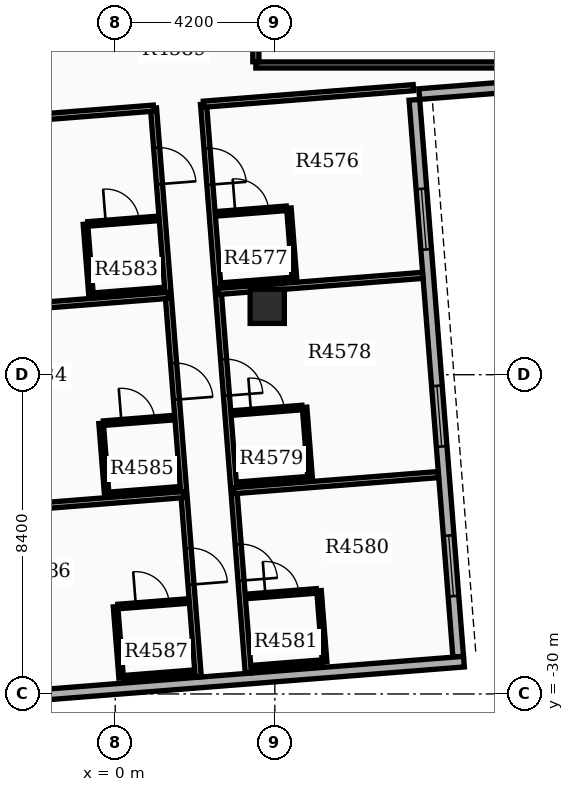
"""IFC4 building model, lengths in metres.
Left out: names, types, materials, properties, quantities, classifications, styles, units other than length and angle.
Written with IfcOpenShell. Run it as: python <this file> out.ifc"""

import sys

from ifc_helpers import new_model, si_unit, direction, frame, frame_2d, origin, origin_2d, place, context, subcontext, project, spatial, rectangle, circle, extrude, element, fill, save


model = new_model("IFC4")
c1 = context("Model", 3, precision=1e-05, world=origin(), true_north=direction((0.0, 1.0)))
c2 = subcontext(c1, "Body", "Model", "MODEL_VIEW")
j1 = project(units=[si_unit("LENGTHUNIT", "METRE"), si_unit("PLANEANGLEUNIT", "RADIAN")], contexts=[c1])
p1 = place(None, origin())
s1 = spatial("IfcSite", under=j1, at=p1, CompositionType="ELEMENT")
p2 = place(p1, origin())
s2 = spatial("IfcBuilding", under=s1, at=p2, CompositionType="ELEMENT")
p3 = place(p2, frame((0.0, 0.0, 285.0)))
s3 = spatial("IfcBuildingStorey", under=s2, at=p3, CompositionType="ELEMENT", Elevation=285.0)
p4 = place(p3, frame((4.0, -19.8, 0.0), z_axis=(0.0, 0.0, 1.0), x_axis=(1.0, 0.0, 0.0)))
e1 = element("IfcColumn", 1, at=p4, inside=s3, PredefinedType="COLUMN", context=c2, shape_type="SweptSolid", body=[
    extrude(circle(Radius=0.45, at=origin_2d()), origin(), (0.0, 0.0, 1.0), 3.9),
])
p5 = place(p3, frame((9.025, -29.021, 0.0), z_axis=(0.0, 0.0, 1.0), x_axis=(-0.078456642068, 0.996917526837, 0.0)))
e2 = element("IfcWall", 2, at=p5, inside=s3, PredefinedType="STANDARD", context=c2, shape_type="SweptSolid", body=[
    extrude(rectangle(XDim=14.7, YDim=0.28, at=frame_2d((7.35, 0.0))), origin(), (0.0, 0.0, 1.0), 3.13),
])
p6 = place(p5, frame((1.6, 0.0, 0.8)))
e3 = element("IfcOpeningElement", 3, at=p6, cuts=e2, PredefinedType="OPENING", context=c2, shape_type="SweptSolid", body=[
    extrude(rectangle(XDim=1.6, YDim=1.7, at=frame_2d((0.8, 0.85))), frame((0.0, 0.15, 0.0), z_axis=(0.0, -1.0, 0.0), x_axis=(1.0, 0.0, 0.0)), (0.0, 0.0, 1.0), 0.3),
])
p7 = place(p5, frame((5.55, 0.0, 0.8)))
e4 = element("IfcOpeningElement", 4, at=p7, cuts=e2, PredefinedType="OPENING", context=c2, shape_type="SweptSolid", body=[
    extrude(rectangle(XDim=1.6, YDim=1.7, at=frame_2d((0.8, 0.85))), frame((0.0, 0.15, 0.0), z_axis=(0.0, -1.0, 0.0), x_axis=(1.0, 0.0, 0.0)), (0.0, 0.0, 1.0), 0.3),
])
p8 = place(p5, frame((10.75, 0.0, 0.8)))
e5 = element("IfcOpeningElement", 5, at=p8, cuts=e2, PredefinedType="OPENING", context=c2, shape_type="SweptSolid", body=[
    extrude(rectangle(XDim=1.6, YDim=1.7, at=frame_2d((0.8, 0.85))), frame((0.0, 0.15, 0.0), z_axis=(0.0, -1.0, 0.0), x_axis=(1.0, 0.0, 0.0)), (0.0, 0.0, 1.0), 0.3),
])
p9 = place(p3, frame((-4.502, -30.226, 0.0), z_axis=(0.0, 0.0, 1.0), x_axis=(0.996917480881, 0.078457226018, 0.0)))
e6 = element("IfcWall", 6, at=p9, inside=s3, PredefinedType="STANDARD", context=c2, shape_type="SweptSolid", body=[
    extrude(rectangle(XDim=13.72, YDim=0.28, at=frame_2d((6.86, 0.0))), origin(), (0.0, 0.0, 1.0), 3.13),
])
p10 = place(p9, frame((0.85, 0.0, 0.85)))
e7 = element("IfcOpeningElement", 7, at=p10, cuts=e6, PredefinedType="OPENING", context=c2, shape_type="SweptSolid", body=[
    extrude(rectangle(XDim=1.0, YDim=1.5, at=frame_2d((0.5, 0.75))), frame((0.0, 0.15, 0.0), z_axis=(0.0, -1.0, 0.0), x_axis=(1.0, 0.0, 0.0)), (0.0, 0.0, 1.0), 0.3),
])
p11 = place(p3, frame((14.281, -13.722, 0.0), z_axis=(0.0, 0.0, 1.0), x_axis=(-0.99691915642, -0.078435932851, 0.0)))
e8 = element("IfcWall", 8, at=p11, inside=s3, PredefinedType="STANDARD", context=c2, shape_type="SweptSolid", body=[
    extrude(rectangle(XDim=6.3, YDim=0.28, at=frame_2d((3.15, 0.0))), origin(), (0.0, 0.0, 1.0), 3.13),
])
p12 = place(p3, frame((3.7, -13.45, 0.0), z_axis=(0.0, 0.0, 1.0), x_axis=(1.0, 0.0, 0.0)))
e9 = element("IfcWall", 9, at=p12, inside=s3, PredefinedType="PARTITIONING", context=c2, shape_type="SweptSolid", body=[
    extrude(rectangle(XDim=7.3, YDim=0.16, at=frame_2d((3.65, 0.0))), origin(), (0.0, 0.0, 1.0), 3.12),
])
p13 = place(p3, frame((3.7, -13.365, 0.0), z_axis=(0.0, 0.0, 1.0), x_axis=(0.0, 1.0, 0.0)))
e10 = element("IfcWall", 10, at=p13, inside=s3, PredefinedType="PARTITIONING", context=c2, shape_type="SweptSolid", body=[
    extrude(rectangle(XDim=1.83, YDim=0.16, at=frame_2d((0.915, 0.0))), origin(), (0.0, 0.0, 1.0), 3.12),
])
p14 = place(p3, frame((2.323, -14.482, 0.0), z_axis=(0.0, 0.0, 1.0), x_axis=(0.078453666116, -0.996917761038, 0.0)))
e11 = element("IfcWall", 11, at=p14, inside=s3, PredefinedType="PARTITIONING", context=c2, shape_type="SweptSolid", body=[
    extrude(rectangle(XDim=15.012, YDim=0.16, at=frame_2d((7.506, 0.0))), origin(), (0.0, 0.0, 1.0), 3.12),
])
p15 = place(p14, frame((1.165, 0.0, 0.0)))
e12 = element("IfcOpeningElement", 12, at=p15, cuts=e11, PredefinedType="OPENING", context=c2, shape_type="SweptSolid", body=[
    extrude(rectangle(XDim=0.96, YDim=2.15, at=frame_2d((0.48, 1.075))), frame((0.0, 0.09, 0.0), z_axis=(0.0, -1.0, 0.0), x_axis=(1.0, 0.0, 0.0)), (0.0, 0.0, 1.0), 0.18),
])
p16 = place(p14, frame((6.734, 0.0, 0.0)))
e13 = element("IfcOpeningElement", 13, at=p16, cuts=e11, PredefinedType="OPENING", context=c2, shape_type="SweptSolid", body=[
    extrude(rectangle(XDim=0.96, YDim=2.15, at=frame_2d((0.48, 1.075))), frame((0.0, 0.09, 0.0), z_axis=(0.0, -1.0, 0.0), x_axis=(1.0, 0.0, 0.0)), (0.0, 0.0, 1.0), 0.18),
])
p17 = place(p14, frame((11.616, 0.0, 0.0)))
e14 = element("IfcOpeningElement", 14, at=p17, cuts=e11, PredefinedType="OPENING", context=c2, shape_type="SweptSolid", body=[
    extrude(rectangle(XDim=0.96, YDim=2.15, at=frame_2d((0.48, 1.075))), frame((0.0, 0.09, 0.0), z_axis=(0.0, -1.0, 0.0), x_axis=(1.0, 0.0, 0.0)), (0.0, 0.0, 1.0), 0.18),
])
p18 = place(p3, frame((2.323, -14.482, 0.0), z_axis=(0.0, 0.0, 1.0), x_axis=(0.996915230802, 0.078485811425, 0.0)))
e15 = element("IfcWall", 15, at=p18, inside=s3, PredefinedType="PARTITIONING", context=c2, shape_type="SweptSolid", body=[
    extrude(rectangle(XDim=5.54, YDim=0.16, at=frame_2d((2.77, 0.0))), origin(), (0.0, 0.0, 1.0), 3.12),
])
p19 = place(p3, frame((2.711, -19.409, 0.0), z_axis=(0.0, 0.0, 1.0), x_axis=(0.996916817298, 0.078465657388, 0.0)))
e16 = element("IfcWall", 16, at=p19, inside=s3, PredefinedType="PARTITIONING", context=c2, shape_type="SweptSolid", body=[
    extrude(rectangle(XDim=5.392, YDim=0.16, at=frame_2d((2.696, 0.0))), origin(), (0.0, 0.0, 1.0), 3.12),
])
p20 = place(p3, frame((2.691, -17.365, 0.0), z_axis=(0.0, 0.0, 1.0), x_axis=(0.996916400774, 0.0784709492, 0.0)))
e17 = element("IfcWall", 17, at=p20, inside=s3, PredefinedType="PARTITIONING", context=c2, shape_type="SweptSolid", body=[
    extrude(rectangle(XDim=1.82, YDim=0.12, at=frame_2d((0.91, 0.0))), origin(), (0.0, 0.0, 1.0), 3.12),
])
p21 = place(p20, frame((0.47, 0.0, 0.0)))
e18 = element("IfcOpeningElement", 18, at=p21, cuts=e17, PredefinedType="OPENING", context=c2, shape_type="SweptSolid", body=[
    extrude(rectangle(XDim=0.88, YDim=2.1, at=frame_2d((0.44, 1.05))), frame((0.0, 0.07, 0.0), z_axis=(0.0, -1.0, 0.0), x_axis=(1.0, 0.0, 0.0)), (0.0, 0.0, 1.0), 0.14),
])
p22 = place(p3, frame((2.838, -19.239, 0.0), z_axis=(0.0, 0.0, 1.0), x_axis=(0.996916400774, 0.0784709492, 0.0)))
e19 = element("IfcWall", 19, at=p22, inside=s3, PredefinedType="PARTITIONING", context=c2, shape_type="SweptSolid", body=[
    extrude(rectangle(XDim=1.82, YDim=0.12, at=frame_2d((0.91, 0.0))), origin(), (0.0, 0.0, 1.0), 3.12),
])
p23 = place(p3, frame((4.57, -17.217, 0.0), z_axis=(0.0, 0.0, 1.0), x_axis=(0.07843418698, -0.996919293781, 0.0)))
e20 = element("IfcWall", 20, at=p23, inside=s3, PredefinedType="PARTITIONING", context=c2, shape_type="SweptSolid", body=[
    extrude(rectangle(XDim=1.88, YDim=0.12, at=frame_2d((0.94, 0.0))), origin(), (0.0, 0.0, 1.0), 3.12),
])
p24 = place(p3, frame((3.124, -24.651, 0.0), z_axis=(0.0, 0.0, 1.0), x_axis=(0.996916538512, 0.078469199312, 0.0)))
e21 = element("IfcWall", 21, at=p24, inside=s3, PredefinedType="PARTITIONING", context=c2, shape_type="SweptSolid", body=[
    extrude(rectangle(XDim=5.392, YDim=0.16, at=frame_2d((2.696, 0.0))), origin(), (0.0, 0.0, 1.0), 3.12),
])
p25 = place(p3, frame((3.103, -22.606, 0.0), z_axis=(0.0, 0.0, 1.0), x_axis=(0.996915574626, 0.078481444107, 0.0)))
e22 = element("IfcWall", 22, at=p25, inside=s3, PredefinedType="PARTITIONING", context=c2, shape_type="SweptSolid", body=[
    extrude(rectangle(XDim=1.82, YDim=0.12, at=frame_2d((0.91, 0.0))), origin(), (0.0, 0.0, 1.0), 3.12),
])
p26 = place(p25, frame((0.47, 0.0, 0.0)))
e23 = element("IfcOpeningElement", 23, at=p26, cuts=e22, PredefinedType="OPENING", context=c2, shape_type="SweptSolid", body=[
    extrude(rectangle(XDim=0.88, YDim=2.1, at=frame_2d((0.44, 1.05))), frame((0.0, 0.07, 0.0), z_axis=(0.0, -1.0, 0.0), x_axis=(1.0, 0.0, 0.0)), (0.0, 0.0, 1.0), 0.14),
])
p27 = place(p3, frame((3.251, -24.48, 0.0), z_axis=(0.0, 0.0, 1.0), x_axis=(0.996916400774, 0.0784709492, 0.0)))
e24 = element("IfcWall", 24, at=p27, inside=s3, PredefinedType="PARTITIONING", context=c2, shape_type="SweptSolid", body=[
    extrude(rectangle(XDim=1.82, YDim=0.12, at=frame_2d((0.91, 0.0))), origin(), (0.0, 0.0, 1.0), 3.12),
])
p28 = place(p3, frame((4.982, -22.458, 0.0), z_axis=(0.0, 0.0, 1.0), x_axis=(0.07843418698, -0.996919293781, 0.0)))
e25 = element("IfcWall", 25, at=p28, inside=s3, PredefinedType="PARTITIONING", context=c2, shape_type="SweptSolid", body=[
    extrude(rectangle(XDim=1.88, YDim=0.12, at=frame_2d((0.94, 0.0))), origin(), (0.0, 0.0, 1.0), 3.12),
])
p29 = place(p3, frame((3.483, -27.431, 0.0), z_axis=(0.0, 0.0, 1.0), x_axis=(0.996916400774, 0.0784709492, 0.0)))
e26 = element("IfcWall", 26, at=p29, inside=s3, PredefinedType="PARTITIONING", context=c2, shape_type="SweptSolid", body=[
    extrude(rectangle(XDim=1.82, YDim=0.12, at=frame_2d((0.91, 0.0))), origin(), (0.0, 0.0, 1.0), 3.12),
])
p30 = place(p29, frame((0.47, 0.0, 0.0)))
e27 = element("IfcOpeningElement", 27, at=p30, cuts=e26, PredefinedType="OPENING", context=c2, shape_type="SweptSolid", body=[
    extrude(rectangle(XDim=0.88, YDim=2.1, at=frame_2d((0.44, 1.05))), frame((0.0, 0.07, 0.0), z_axis=(0.0, -1.0, 0.0), x_axis=(1.0, 0.0, 0.0)), (0.0, 0.0, 1.0), 0.14),
])
p31 = place(p3, frame((3.631, -29.305, 0.0), z_axis=(0.0, 0.0, 1.0), x_axis=(0.996915574626, 0.078481444107, 0.0)))
e28 = element("IfcWall", 28, at=p31, inside=s3, PredefinedType="PARTITIONING", context=c2, shape_type="SweptSolid", body=[
    extrude(rectangle(XDim=1.82, YDim=0.12, at=frame_2d((0.91, 0.0))), origin(), (0.0, 0.0, 1.0), 3.12),
])
p32 = place(p3, frame((5.362, -27.283, 0.0), z_axis=(0.0, 0.0, 1.0), x_axis=(0.07843418698, -0.996919293781, 0.0)))
e29 = element("IfcWall", 29, at=p32, inside=s3, PredefinedType="PARTITIONING", context=c2, shape_type="SweptSolid", body=[
    extrude(rectangle(XDim=1.88, YDim=0.12, at=frame_2d((0.94, 0.0))), origin(), (0.0, 0.0, 1.0), 3.12),
])
p33 = place(p3, frame((1.008, -14.586, 0.0), z_axis=(0.0, 0.0, 1.0), x_axis=(0.078453666116, -0.996917761038, 0.0)))
e30 = element("IfcWall", 30, at=p33, inside=s3, PredefinedType="PARTITIONING", context=c2, shape_type="SweptSolid", body=[
    extrude(rectangle(XDim=15.012, YDim=0.16, at=frame_2d((7.506, 0.0))), origin(), (0.0, 0.0, 1.0), 3.12),
])
p34 = place(p33, frame((1.046, 0.0, 0.0)))
e31 = element("IfcOpeningElement", 31, at=p34, cuts=e30, PredefinedType="OPENING", context=c2, shape_type="SweptSolid", body=[
    extrude(rectangle(XDim=0.96, YDim=2.15, at=frame_2d((0.48, 1.075))), frame((0.0, 0.09, 0.0), z_axis=(0.0, -1.0, 0.0), x_axis=(1.0, 0.0, 0.0)), (0.0, 0.0, 1.0), 0.18),
])
p35 = place(p33, frame((6.734, 0.0, 0.0)))
e32 = element("IfcOpeningElement", 32, at=p35, cuts=e30, PredefinedType="OPENING", context=c2, shape_type="SweptSolid", body=[
    extrude(rectangle(XDim=0.96, YDim=2.15, at=frame_2d((0.48, 1.075))), frame((0.0, 0.09, 0.0), z_axis=(0.0, -1.0, 0.0), x_axis=(1.0, 0.0, 0.0)), (0.0, 0.0, 1.0), 0.18),
])
p36 = place(p33, frame((11.616, 0.0, 0.0)))
e33 = element("IfcOpeningElement", 33, at=p36, cuts=e30, PredefinedType="OPENING", context=c2, shape_type="SweptSolid", body=[
    extrude(rectangle(XDim=0.96, YDim=2.15, at=frame_2d((0.48, 1.075))), frame((0.0, 0.09, 0.0), z_axis=(0.0, -1.0, 0.0), x_axis=(1.0, 0.0, 0.0)), (0.0, 0.0, 1.0), 0.18),
])
p37 = place(p3, frame((1.008, -14.586, 0.0), z_axis=(0.0, 0.0, 1.0), x_axis=(-0.996916277751, -0.078472512094, 0.0)))
e34 = element("IfcWall", 34, at=p37, inside=s3, PredefinedType="PARTITIONING", context=c2, shape_type="SweptSolid", body=[
    extrude(rectangle(XDim=6.58, YDim=0.16, at=frame_2d((3.29, 0.0))), origin(), (0.0, 0.0, 1.0), 3.12),
])
p38 = place(p3, frame((1.395, -19.513, 0.0), z_axis=(0.0, 0.0, 1.0), x_axis=(-0.996917397945, -0.078458279834, 0.0)))
e35 = element("IfcWall", 35, at=p38, inside=s3, PredefinedType="PARTITIONING", context=c2, shape_type="SweptSolid", body=[
    extrude(rectangle(XDim=6.432, YDim=0.16, at=frame_2d((3.216, 0.0))), origin(), (0.0, 0.0, 1.0), 3.12),
])
p39 = place(p3, frame((-0.719, -17.633, 0.0), z_axis=(0.0, 0.0, 1.0), x_axis=(0.996916400774, 0.0784709492, 0.0)))
e36 = element("IfcWall", 36, at=p39, inside=s3, PredefinedType="PARTITIONING", context=c2, shape_type="SweptSolid", body=[
    extrude(rectangle(XDim=1.82, YDim=0.12, at=frame_2d((0.91, 0.0))), origin(), (0.0, 0.0, 1.0), 3.12),
])
p40 = place(p39, frame((0.47, 0.0, 0.0)))
e37 = element("IfcOpeningElement", 37, at=p40, cuts=e36, PredefinedType="OPENING", context=c2, shape_type="SweptSolid", body=[
    extrude(rectangle(XDim=0.88, YDim=2.1, at=frame_2d((0.44, 1.05))), frame((0.0, 0.07, 0.0), z_axis=(0.0, -1.0, 0.0), x_axis=(1.0, 0.0, 0.0)), (0.0, 0.0, 1.0), 0.14),
])
p41 = place(p3, frame((-0.571, -19.507, 0.0), z_axis=(0.0, 0.0, 1.0), x_axis=(0.996916400774, 0.0784709492, 0.0)))
e38 = element("IfcWall", 38, at=p41, inside=s3, PredefinedType="PARTITIONING", context=c2, shape_type="SweptSolid", body=[
    extrude(rectangle(XDim=1.82, YDim=0.12, at=frame_2d((0.91, 0.0))), origin(), (0.0, 0.0, 1.0), 3.12),
])
p42 = place(p3, frame((-0.784, -17.638, 0.0), z_axis=(0.0, 0.0, 1.0), x_axis=(0.078553074946, -0.996909932951, 0.0)))
e39 = element("IfcWall", 39, at=p42, inside=s3, PredefinedType="PARTITIONING", context=c2, shape_type="SweptSolid", body=[
    extrude(rectangle(XDim=1.88, YDim=0.12, at=frame_2d((0.94, 0.0))), origin(), (0.0, 0.0, 1.0), 3.12),
])
p43 = place(p3, frame((1.808, -24.754, 0.0), z_axis=(0.0, 0.0, 1.0), x_axis=(-0.996917631587, -0.078455311041, 0.0)))
e40 = element("IfcWall", 40, at=p43, inside=s3, PredefinedType="PARTITIONING", context=c2, shape_type="SweptSolid", body=[
    extrude(rectangle(XDim=6.432, YDim=0.16, at=frame_2d((3.216, 0.0))), origin(), (0.0, 0.0, 1.0), 3.12),
])
p44 = place(p3, frame((-0.306, -22.875, 0.0), z_axis=(0.0, 0.0, 1.0), x_axis=(0.996916400774, 0.0784709492, 0.0)))
e41 = element("IfcWall", 41, at=p44, inside=s3, PredefinedType="PARTITIONING", context=c2, shape_type="SweptSolid", body=[
    extrude(rectangle(XDim=1.82, YDim=0.12, at=frame_2d((0.91, 0.0))), origin(), (0.0, 0.0, 1.0), 3.12),
])
p45 = place(p44, frame((0.47, 0.0, 0.0)))
e42 = element("IfcOpeningElement", 42, at=p45, cuts=e41, PredefinedType="OPENING", context=c2, shape_type="SweptSolid", body=[
    extrude(rectangle(XDim=0.88, YDim=2.1, at=frame_2d((0.44, 1.05))), frame((0.0, 0.07, 0.0), z_axis=(0.0, -1.0, 0.0), x_axis=(1.0, 0.0, 0.0)), (0.0, 0.0, 1.0), 0.14),
])
p46 = place(p3, frame((-0.159, -24.749, 0.0), z_axis=(0.0, 0.0, 1.0), x_axis=(0.996916400774, 0.0784709492, 0.0)))
e43 = element("IfcWall", 43, at=p46, inside=s3, PredefinedType="PARTITIONING", context=c2, shape_type="SweptSolid", body=[
    extrude(rectangle(XDim=1.82, YDim=0.12, at=frame_2d((0.91, 0.0))), origin(), (0.0, 0.0, 1.0), 3.12),
])
p47 = place(p3, frame((-0.371, -22.88, 0.0), z_axis=(0.0, 0.0, 1.0), x_axis=(0.078563244057, -0.996909131608, 0.0)))
e44 = element("IfcWall", 44, at=p47, inside=s3, PredefinedType="PARTITIONING", context=c2, shape_type="SweptSolid", body=[
    extrude(rectangle(XDim=1.88, YDim=0.12, at=frame_2d((0.94, 0.0))), origin(), (0.0, 0.0, 1.0), 3.12),
])
p48 = place(p3, frame((0.073, -27.7, 0.0), z_axis=(0.0, 0.0, 1.0), x_axis=(0.996916400774, 0.0784709492, 0.0)))
e45 = element("IfcWall", 45, at=p48, inside=s3, PredefinedType="PARTITIONING", context=c2, shape_type="SweptSolid", body=[
    extrude(rectangle(XDim=1.82, YDim=0.12, at=frame_2d((0.91, 0.0))), origin(), (0.0, 0.0, 1.0), 3.12),
])
p49 = place(p48, frame((0.47, 0.0, 0.0)))
e46 = element("IfcOpeningElement", 46, at=p49, cuts=e45, PredefinedType="OPENING", context=c2, shape_type="SweptSolid", body=[
    extrude(rectangle(XDim=0.88, YDim=2.1, at=frame_2d((0.44, 1.05))), frame((0.0, 0.07, 0.0), z_axis=(0.0, -1.0, 0.0), x_axis=(1.0, 0.0, 0.0)), (0.0, 0.0, 1.0), 0.14),
])
p50 = place(p3, frame((0.221, -29.574, 0.0), z_axis=(0.0, 0.0, 1.0), x_axis=(0.996916400774, 0.0784709492, 0.0)))
e47 = element("IfcWall", 47, at=p50, inside=s3, PredefinedType="PARTITIONING", context=c2, shape_type="SweptSolid", body=[
    extrude(rectangle(XDim=1.82, YDim=0.12, at=frame_2d((0.91, 0.0))), origin(), (0.0, 0.0, 1.0), 3.12),
])
p51 = place(p3, frame((0.009, -27.705, 0.0), z_axis=(0.0, 0.0, 1.0), x_axis=(0.07843418698, -0.996919293781, 0.0)))
e48 = element("IfcWall", 48, at=p51, inside=s3, PredefinedType="PARTITIONING", context=c2, shape_type="SweptSolid", body=[
    extrude(rectangle(XDim=1.88, YDim=0.12, at=frame_2d((0.94, 0.0))), origin(), (0.0, 0.0, 1.0), 3.12),
])
p52 = place(p6, origin())
e49 = element("IfcWindow", 49, at=p52, inside=s3, PartitioningType="SINGLE_PANEL", PredefinedType="WINDOW", context=c2, shape_type="SweptSolid", body=[
    extrude(rectangle(XDim=1.6, YDim=1.7, at=frame_2d((0.8, 0.85))), frame((0.0, 0.03, 0.0), z_axis=(0.0, -1.0, 0.0), x_axis=(1.0, 0.0, 0.0)), (0.0, 0.0, 1.0), 0.06),
])
fill(e3, e49)
p53 = place(p7, origin())
e50 = element("IfcWindow", 50, at=p53, inside=s3, PartitioningType="SINGLE_PANEL", PredefinedType="WINDOW", context=c2, shape_type="SweptSolid", body=[
    extrude(rectangle(XDim=1.6, YDim=1.7, at=frame_2d((0.8, 0.85))), frame((0.0, 0.03, 0.0), z_axis=(0.0, -1.0, 0.0), x_axis=(1.0, 0.0, 0.0)), (0.0, 0.0, 1.0), 0.06),
])
fill(e4, e50)
p54 = place(p8, origin())
e51 = element("IfcWindow", 51, at=p54, inside=s3, PartitioningType="SINGLE_PANEL", PredefinedType="WINDOW", context=c2, shape_type="SweptSolid", body=[
    extrude(rectangle(XDim=1.6, YDim=1.7, at=frame_2d((0.8, 0.85))), frame((0.0, 0.03, 0.0), z_axis=(0.0, -1.0, 0.0), x_axis=(1.0, 0.0, 0.0)), (0.0, 0.0, 1.0), 0.06),
])
fill(e5, e51)
p55 = place(p15, origin())
e52 = element("IfcDoor", 52, at=p55, inside=s3, OperationType="SINGLE_SWING_RIGHT", PredefinedType="DOOR", context=c2, shape_type="SweptSolid", body=[
    extrude(rectangle(XDim=0.96, YDim=2.15, at=frame_2d((0.48, 1.075))), frame((0.0, 0.025, 0.0), z_axis=(0.0, -1.0, 0.0), x_axis=(1.0, 0.0, 0.0)), (0.0, 0.0, 1.0), 0.05),
])
fill(e12, e52)
p56 = place(p21, origin())
e53 = element("IfcDoor", 53, at=p56, inside=s3, OperationType="SINGLE_SWING_LEFT", PredefinedType="DOOR", context=c2, shape_type="SweptSolid", body=[
    extrude(rectangle(XDim=0.88, YDim=2.1, at=frame_2d((0.44, 1.05))), frame((0.0, 0.025, 0.0), z_axis=(0.0, -1.0, 0.0), x_axis=(1.0, 0.0, 0.0)), (0.0, 0.0, 1.0), 0.05),
])
fill(e18, e53)
p57 = place(p16, origin())
e54 = element("IfcDoor", 54, at=p57, inside=s3, OperationType="SINGLE_SWING_RIGHT", PredefinedType="DOOR", context=c2, shape_type="SweptSolid", body=[
    extrude(rectangle(XDim=0.96, YDim=2.15, at=frame_2d((0.48, 1.075))), frame((0.0, 0.025, 0.0), z_axis=(0.0, -1.0, 0.0), x_axis=(1.0, 0.0, 0.0)), (0.0, 0.0, 1.0), 0.05),
])
fill(e13, e54)
p58 = place(p26, origin())
e55 = element("IfcDoor", 55, at=p58, inside=s3, OperationType="SINGLE_SWING_LEFT", PredefinedType="DOOR", context=c2, shape_type="SweptSolid", body=[
    extrude(rectangle(XDim=0.88, YDim=2.1, at=frame_2d((0.44, 1.05))), frame((0.0, 0.025, 0.0), z_axis=(0.0, -1.0, 0.0), x_axis=(1.0, 0.0, 0.0)), (0.0, 0.0, 1.0), 0.05),
])
fill(e23, e55)
p59 = place(p17, origin())
e56 = element("IfcDoor", 56, at=p59, inside=s3, OperationType="SINGLE_SWING_RIGHT", PredefinedType="DOOR", context=c2, shape_type="SweptSolid", body=[
    extrude(rectangle(XDim=0.96, YDim=2.15, at=frame_2d((0.48, 1.075))), frame((0.0, 0.025, 0.0), z_axis=(0.0, -1.0, 0.0), x_axis=(1.0, 0.0, 0.0)), (0.0, 0.0, 1.0), 0.05),
])
fill(e14, e56)
p60 = place(p30, origin())
e57 = element("IfcDoor", 57, at=p60, inside=s3, OperationType="SINGLE_SWING_LEFT", PredefinedType="DOOR", context=c2, shape_type="SweptSolid", body=[
    extrude(rectangle(XDim=0.88, YDim=2.1, at=frame_2d((0.44, 1.05))), frame((0.0, 0.025, 0.0), z_axis=(0.0, -1.0, 0.0), x_axis=(1.0, 0.0, 0.0)), (0.0, 0.0, 1.0), 0.05),
])
fill(e27, e57)
p61 = place(p34, origin())
e58 = element("IfcDoor", 58, at=p61, inside=s3, OperationType="SINGLE_SWING_RIGHT", PredefinedType="DOOR", context=c2, shape_type="SweptSolid", body=[
    extrude(rectangle(XDim=0.96, YDim=2.15, at=frame_2d((0.48, 1.075))), frame((0.0, 0.025, 0.0), z_axis=(0.0, -1.0, 0.0), x_axis=(1.0, 0.0, 0.0)), (0.0, 0.0, 1.0), 0.05),
])
fill(e31, e58)
p62 = place(p40, origin())
e59 = element("IfcDoor", 59, at=p62, inside=s3, OperationType="SINGLE_SWING_LEFT", PredefinedType="DOOR", context=c2, shape_type="SweptSolid", body=[
    extrude(rectangle(XDim=0.88, YDim=2.1, at=frame_2d((0.44, 1.05))), frame((0.0, 0.025, 0.0), z_axis=(0.0, -1.0, 0.0), x_axis=(1.0, 0.0, 0.0)), (0.0, 0.0, 1.0), 0.05),
])
fill(e37, e59)
p63 = place(p35, origin())
e60 = element("IfcDoor", 60, at=p63, inside=s3, OperationType="SINGLE_SWING_RIGHT", PredefinedType="DOOR", context=c2, shape_type="SweptSolid", body=[
    extrude(rectangle(XDim=0.96, YDim=2.15, at=frame_2d((0.48, 1.075))), frame((0.0, 0.025, 0.0), z_axis=(0.0, -1.0, 0.0), x_axis=(1.0, 0.0, 0.0)), (0.0, 0.0, 1.0), 0.05),
])
fill(e32, e60)
p64 = place(p45, origin())
e61 = element("IfcDoor", 61, at=p64, inside=s3, OperationType="SINGLE_SWING_LEFT", PredefinedType="DOOR", context=c2, shape_type="SweptSolid", body=[
    extrude(rectangle(XDim=0.88, YDim=2.1, at=frame_2d((0.44, 1.05))), frame((0.0, 0.025, 0.0), z_axis=(0.0, -1.0, 0.0), x_axis=(1.0, 0.0, 0.0)), (0.0, 0.0, 1.0), 0.05),
])
fill(e42, e61)
p65 = place(p36, origin())
e62 = element("IfcDoor", 62, at=p65, inside=s3, OperationType="SINGLE_SWING_RIGHT", PredefinedType="DOOR", context=c2, shape_type="SweptSolid", body=[
    extrude(rectangle(XDim=0.96, YDim=2.15, at=frame_2d((0.48, 1.075))), frame((0.0, 0.025, 0.0), z_axis=(0.0, -1.0, 0.0), x_axis=(1.0, 0.0, 0.0)), (0.0, 0.0, 1.0), 0.05),
])
fill(e33, e62)
p66 = place(p49, origin())
e63 = element("IfcDoor", 63, at=p66, inside=s3, OperationType="SINGLE_SWING_LEFT", PredefinedType="DOOR", context=c2, shape_type="SweptSolid", body=[
    extrude(rectangle(XDim=0.88, YDim=2.1, at=frame_2d((0.44, 1.05))), frame((0.0, 0.025, 0.0), z_axis=(0.0, -1.0, 0.0), x_axis=(1.0, 0.0, 0.0)), (0.0, 0.0, 1.0), 0.05),
])
fill(e46, e63)
save(model, sys.argv[1])
